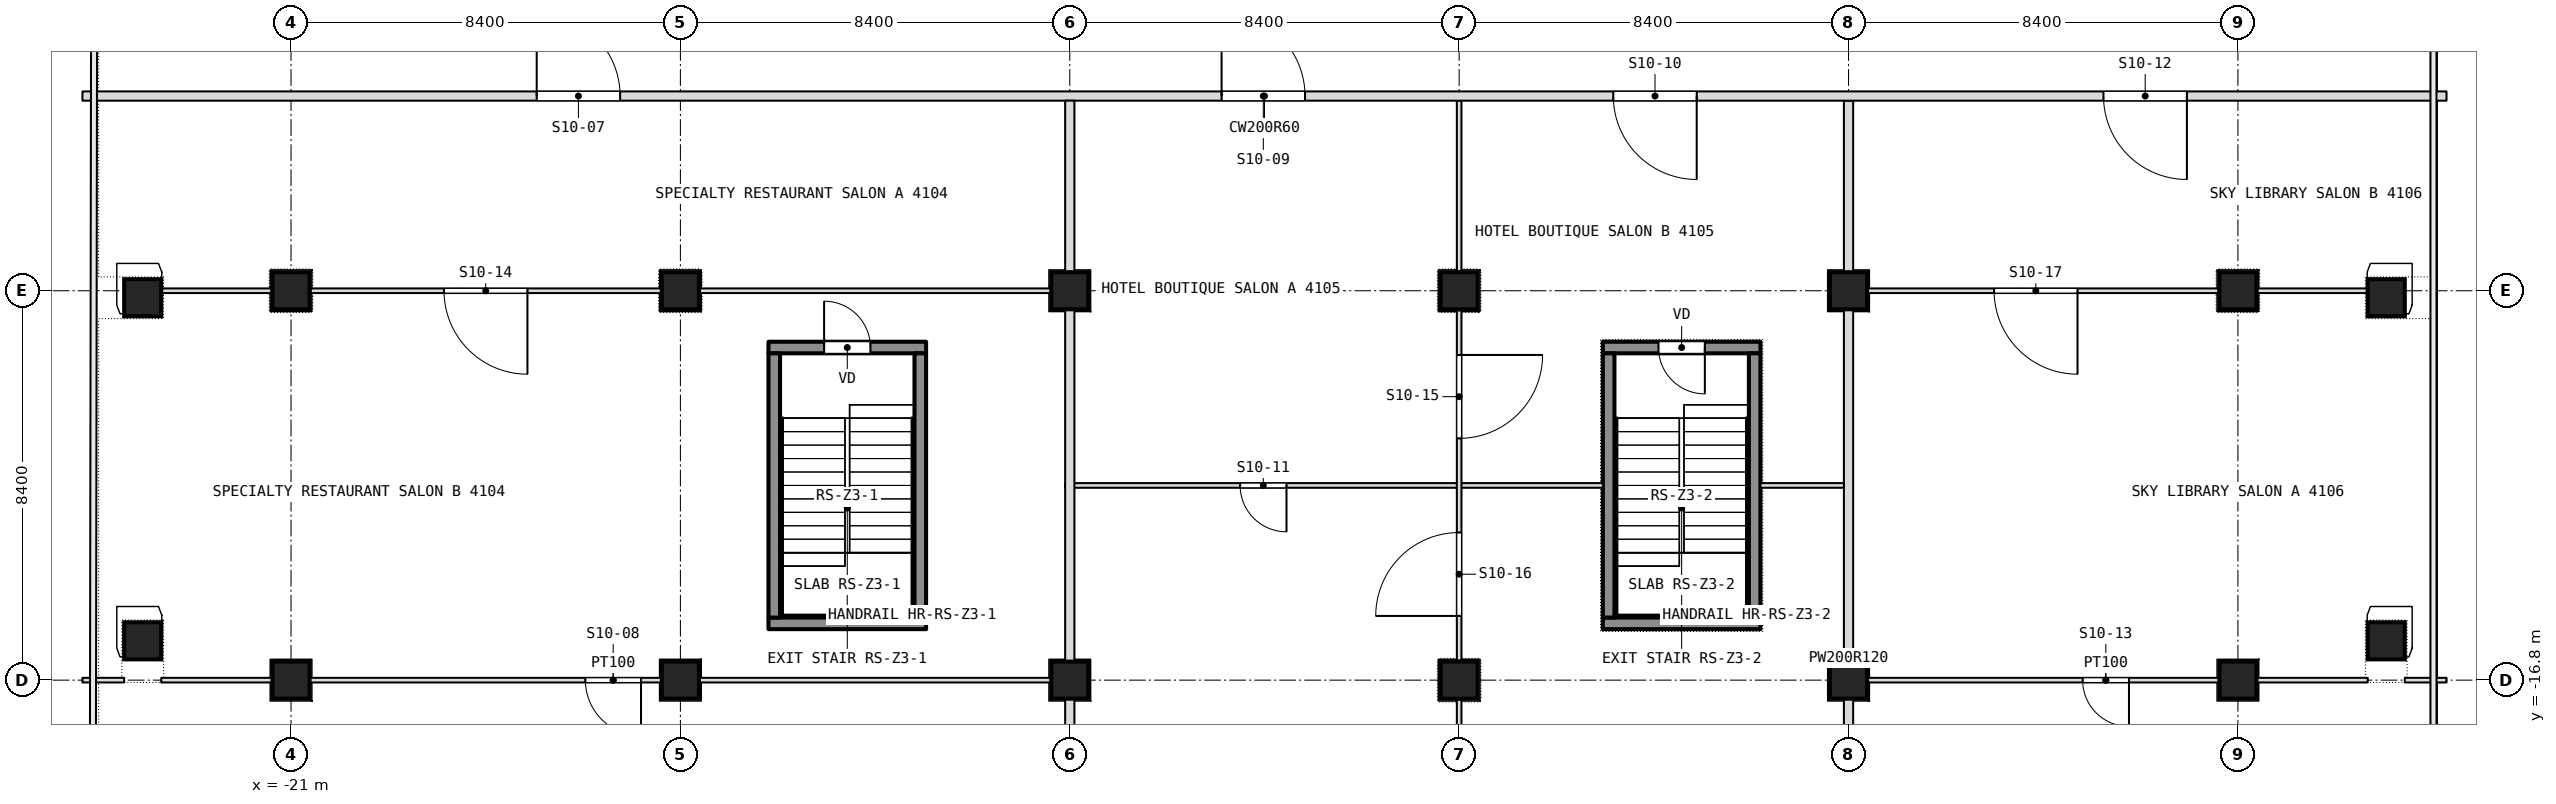
"""IFC4 building model, lengths in metres.
Left out: names, types, materials, properties, quantities, classifications, styles, units other than length and angle.
Written with IfcOpenShell. Run it as: python <this file> out.ifc"""

import sys

from ifc_helpers import new_model, si_unit, direction, frame, frame_2d, origin, origin_2d, place, context, subcontext, project, spatial, rectangle, extrude, element, fill, save


model = new_model("IFC4")
c1 = context("Model", 3, precision=1e-05, world=origin(), true_north=direction((0.0, 1.0)))
c2 = subcontext(c1, "Body", "Model", "MODEL_VIEW")
j1 = project(units=[si_unit("LENGTHUNIT", "METRE"), si_unit("PLANEANGLEUNIT", "RADIAN")], contexts=[c1])
p1 = place(None, origin())
s1 = spatial("IfcSite", under=j1, at=p1, CompositionType="ELEMENT")
p2 = place(p1, origin())
s2 = spatial("IfcBuilding", under=s1, at=p2, CompositionType="ELEMENT")
p3 = place(p2, frame((0.0, 0.0, 180.5)))
s3 = spatial("IfcBuildingStorey", under=s2, at=p3, CompositionType="ELEMENT", Elevation=180.5)
for number, where, z_axis, x_axis in (
    (1, (-21.0, -16.8, 0.0), (0.0, 0.0, 1.0), (1.0, 0.0, 0.0)),
    (2, (-21.0, -8.4, 0.0), (0.0, 0.0, 1.0), (1.0, 0.0, 0.0)),
    (3, (-12.6, -16.8, 0.0), (0.0, 0.0, 1.0), (1.0, 0.0, 0.0)),
    (4, (-12.6, -8.4, 0.0), (0.0, 0.0, 1.0), (1.0, 0.0, 0.0)),
    (5, (-4.2, -16.8, 0.0), (0.0, 0.0, 1.0), (1.0, 0.0, 0.0)),
    (6, (-4.2, -8.4, 0.0), (0.0, 0.0, 1.0), (1.0, 0.0, 0.0)),
    (7, (4.2, -16.8, 0.0), (0.0, 0.0, 1.0), (1.0, 0.0, 0.0)),
    (8, (4.2, -8.4, 0.0), (0.0, 0.0, 1.0), (1.0, 0.0, 0.0)),
    (9, (12.6, -16.8, 0.0), (0.0, 0.0, 1.0), (1.0, 0.0, 0.0)),
    (10, (12.6, -8.4, 0.0), (0.0, 0.0, 1.0), (1.0, 0.0, 0.0)),
    (11, (21.0, -16.8, 0.0), (0.0, 0.0, 1.0), (1.0, 0.0, 0.0)),
    (12, (21.0, -8.4, 0.0), (0.0, 0.0, 1.0), (1.0, 0.0, 0.0)),
    (13, (-24.2, -15.952, 0.0), (0.0, 0.0, 1.0), (1.0, 0.0, 0.0)),
    (14, (-24.2, -8.551, 0.0), (0.0, 0.0, 1.0), (1.0, 0.0, 0.0)),
    (15, (24.2, -8.551, 0.0), (0.0, 0.0, 1.0), (1.0, 0.0, 0.0)),
    (16, (24.2, -15.952, 0.0), (0.0, 0.0, 1.0), (1.0, 0.0, 0.0)),
):
    element("IfcColumn", number, at=place(p3, frame(where, z_axis=z_axis, x_axis=x_axis)), inside=s3, PredefinedType="COLUMN", context=c2, shape_type="SweptSolid", body=[
        extrude(rectangle(XDim=0.8, YDim=0.8, at=origin_2d()), origin(), (0.0, 0.0, 1.0), 7.2),
    ])
p4 = place(p3, frame((-25.5, -16.8, 0.0), z_axis=(0.0, 0.0, 1.0), x_axis=(1.0, 0.0, 0.0)))
e17 = element("IfcWall", 17, at=p4, inside=s3, PredefinedType="PARTITIONING", context=c2, shape_type="SweptSolid", body=[
    extrude(rectangle(XDim=0.9, YDim=0.1, at=frame_2d((0.45, 0.0))), origin(), (0.0, 0.0, 1.0), 6.94),
])
p5 = place(p3, frame((-23.8, -16.8, 0.0), z_axis=(0.0, 0.0, 1.0), x_axis=(1.0, 0.0, 0.0)))
e18 = element("IfcWall", 18, at=p5, inside=s3, PredefinedType="PARTITIONING", context=c2, shape_type="SweptSolid", body=[
    extrude(rectangle(XDim=19.5, YDim=0.1, at=frame_2d((9.75, 0.0))), origin(), (0.0, 0.0, 1.0), 6.54),
])
p6 = place(p5, frame((9.15, 0.0, 0.0)))
e19 = element("IfcOpeningElement", 19, at=p6, cuts=e18, PredefinedType="OPENING", context=c2, shape_type="SweptSolid", body=[
    extrude(rectangle(XDim=1.2, YDim=2.1, at=frame_2d((0.6, 1.05))), frame((0.0, 0.05, 0.0), z_axis=(0.0, -1.0, 0.0), x_axis=(1.0, 0.0, 0.0)), (0.0, 0.0, 1.0), 0.1),
])
p7 = place(p3, frame((12.5, -16.8, 0.0), z_axis=(0.0, 0.0, 1.0), x_axis=(1.0, 0.0, 0.0)))
e20 = element("IfcWall", 20, at=p7, inside=s3, PredefinedType="PARTITIONING", context=c2, shape_type="SweptSolid", body=[
    extrude(rectangle(XDim=11.3, YDim=0.1, at=frame_2d((5.65, 0.0))), origin(), (0.0, 0.0, 1.0), 6.54),
])
p8 = place(p7, frame((5.15, 0.0, 0.0)))
e21 = element("IfcOpeningElement", 21, at=p8, cuts=e20, PredefinedType="OPENING", context=c2, shape_type="SweptSolid", body=[
    extrude(rectangle(XDim=1.0, YDim=2.1, at=frame_2d((0.5, 1.05))), frame((0.0, 0.05, 0.0), z_axis=(0.0, -1.0, 0.0), x_axis=(1.0, 0.0, 0.0)), (0.0, 0.0, 1.0), 0.1),
])
p9 = place(p3, frame((24.6, -16.8, 0.0), z_axis=(0.0, 0.0, 1.0), x_axis=(1.0, 0.0, 0.0)))
e22 = element("IfcWall", 22, at=p9, inside=s3, PredefinedType="PARTITIONING", context=c2, shape_type="SweptSolid", body=[
    extrude(rectangle(XDim=0.9, YDim=0.1, at=frame_2d((0.45, 0.0))), origin(), (0.0, 0.0, 1.0), 6.94),
])
p10 = place(p3, frame((12.6, -28.343, 0.0), z_axis=(0.0, 0.0, 1.0), x_axis=(0.0, 1.0, 0.0)))
e23 = element("IfcWall", 23, at=p10, inside=s3, PredefinedType="PARTITIONING", context=c2, shape_type="SweptSolid", body=[
    extrude(rectangle(XDim=24.043, YDim=0.2, at=frame_2d((12.021, 0.0))), origin(), (0.0, 0.0, 1.0), 6.94),
])
p11 = place(p3, frame((-4.3, -12.6, 0.0), z_axis=(0.0, 0.0, 1.0), x_axis=(1.0, 0.0, 0.0)))
e24 = element("IfcWall", 24, at=p11, inside=s3, PredefinedType="PARTITIONING", context=c2, shape_type="SweptSolid", body=[
    extrude(rectangle(XDim=11.6, YDim=0.1, at=frame_2d((5.8, 0.0))), origin(), (0.0, 0.0, 1.0), 6.94),
])
p12 = place(p11, frame((3.775, 0.0, 0.0)))
e25 = element("IfcOpeningElement", 25, at=p12, cuts=e24, PredefinedType="OPENING", context=c2, shape_type="SweptSolid", body=[
    extrude(rectangle(XDim=1.0, YDim=2.1, at=frame_2d((0.5, 1.05))), frame((0.0, 0.05, 0.0), z_axis=(0.0, -1.0, 0.0), x_axis=(1.0, 0.0, 0.0)), (0.0, 0.0, 1.0), 0.1),
])
p13 = place(p3, frame((10.7, -12.6, 0.0), z_axis=(0.0, 0.0, 1.0), x_axis=(1.0, 0.0, 0.0)))
e26 = element("IfcWall", 26, at=p13, inside=s3, PredefinedType="PARTITIONING", context=c2, shape_type="SweptSolid", body=[
    extrude(rectangle(XDim=1.8, YDim=0.1, at=frame_2d((0.9, 0.0))), origin(), (0.0, 0.0, 1.0), 6.94),
])
p14 = place(p3, frame((-23.8, -8.4, 0.0), z_axis=(0.0, 0.0, 1.0), x_axis=(1.0, 0.0, 0.0)))
e27 = element("IfcWall", 27, at=p14, inside=s3, PredefinedType="PARTITIONING", context=c2, shape_type="SweptSolid", body=[
    extrude(rectangle(XDim=2.38, YDim=0.1, at=frame_2d((1.19, 0.0))), origin(), (0.0, 0.0, 1.0), 6.54),
])
p15 = place(p3, frame((-20.58, -8.4, 0.0), z_axis=(0.0, 0.0, 1.0), x_axis=(1.0, 0.0, 0.0)))
e28 = element("IfcWall", 28, at=p15, inside=s3, PredefinedType="PARTITIONING", context=c2, shape_type="SweptSolid", body=[
    extrude(rectangle(XDim=7.56, YDim=0.1, at=frame_2d((3.78, 0.0))), origin(), (0.0, 0.0, 1.0), 6.54),
])
p16 = place(p15, frame((2.88, 0.0, 0.0)))
e29 = element("IfcOpeningElement", 29, at=p16, cuts=e28, PredefinedType="OPENING", context=c2, shape_type="SweptSolid", body=[
    extrude(rectangle(XDim=1.8, YDim=2.1, at=frame_2d((0.9, 1.05))), frame((0.0, 0.05, 0.0), z_axis=(0.0, -1.0, 0.0), x_axis=(1.0, 0.0, 0.0)), (0.0, 0.0, 1.0), 0.1),
])
p17 = place(p3, frame((-12.18, -8.4, 0.0), z_axis=(0.0, 0.0, 1.0), x_axis=(1.0, 0.0, 0.0)))
e30 = element("IfcWall", 30, at=p17, inside=s3, PredefinedType="PARTITIONING", context=c2, shape_type="SweptSolid", body=[
    extrude(rectangle(XDim=7.88, YDim=0.1, at=frame_2d((3.94, 0.0))), origin(), (0.0, 0.0, 1.0), 6.54),
])
p18 = place(p3, frame((12.7, -8.4, 0.0), z_axis=(0.0, 0.0, 1.0), x_axis=(1.0, 0.0, 0.0)))
e31 = element("IfcWall", 31, at=p18, inside=s3, PredefinedType="PARTITIONING", context=c2, shape_type="SweptSolid", body=[
    extrude(rectangle(XDim=7.88, YDim=0.1, at=frame_2d((3.94, 0.0))), origin(), (0.0, 0.0, 1.0), 6.54),
])
p19 = place(p18, frame((3.04, 0.0, 0.0)))
e32 = element("IfcOpeningElement", 32, at=p19, cuts=e31, PredefinedType="OPENING", context=c2, shape_type="SweptSolid", body=[
    extrude(rectangle(XDim=1.8, YDim=2.1, at=frame_2d((0.9, 1.05))), frame((0.0, 0.05, 0.0), z_axis=(0.0, -1.0, 0.0), x_axis=(1.0, 0.0, 0.0)), (0.0, 0.0, 1.0), 0.1),
])
p20 = place(p3, frame((21.42, -8.4, 0.0), z_axis=(0.0, 0.0, 1.0), x_axis=(1.0, 0.0, 0.0)))
e33 = element("IfcWall", 33, at=p20, inside=s3, PredefinedType="PARTITIONING", context=c2, shape_type="SweptSolid", body=[
    extrude(rectangle(XDim=2.38, YDim=0.1, at=frame_2d((1.19, 0.0))), origin(), (0.0, 0.0, 1.0), 6.54),
])
p21 = place(p3, frame((4.2, -24.78, 0.0), z_axis=(0.0, 0.0, 1.0), x_axis=(0.0, 1.0, 0.0)))
e34 = element("IfcWall", 34, at=p21, inside=s3, PredefinedType="PARTITIONING", context=c2, shape_type="SweptSolid", body=[
    extrude(rectangle(XDim=7.56, YDim=0.1, at=frame_2d((3.78, 0.0))), origin(), (0.0, 0.0, 1.0), 6.94),
])
p22 = place(p3, frame((4.2, -16.38, 0.0), z_axis=(0.0, 0.0, 1.0), x_axis=(0.0, 1.0, 0.0)))
e35 = element("IfcWall", 35, at=p22, inside=s3, PredefinedType="PARTITIONING", context=c2, shape_type="SweptSolid", body=[
    extrude(rectangle(XDim=7.56, YDim=0.1, at=frame_2d((3.78, 0.0))), origin(), (0.0, 0.0, 1.0), 6.94),
])
p23 = place(p22, frame((4.795, 0.0, 0.0)))
e36 = element("IfcOpeningElement", 36, at=p23, cuts=e35, PredefinedType="OPENING", context=c2, shape_type="SweptSolid", body=[
    extrude(rectangle(XDim=1.8, YDim=2.1, at=frame_2d((0.9, 1.05))), frame((0.0, 0.05, 0.0), z_axis=(0.0, -1.0, 0.0), x_axis=(1.0, 0.0, 0.0)), (0.0, 0.0, 1.0), 0.1),
])
p24 = place(p22, frame((0.965, 0.0, 0.0)))
e37 = element("IfcOpeningElement", 37, at=p24, cuts=e35, PredefinedType="OPENING", context=c2, shape_type="SweptSolid", body=[
    extrude(rectangle(XDim=1.8, YDim=2.1, at=frame_2d((0.9, 1.05))), frame((0.0, 0.05, 0.0), z_axis=(0.0, -1.0, 0.0), x_axis=(1.0, 0.0, 0.0)), (0.0, 0.0, 1.0), 0.1),
])
p25 = place(p3, frame((4.2, -7.98, 0.0), z_axis=(0.0, 0.0, 1.0), x_axis=(0.0, 1.0, 0.0)))
e38 = element("IfcWall", 38, at=p25, inside=s3, PredefinedType="PARTITIONING", context=c2, shape_type="SweptSolid", body=[
    extrude(rectangle(XDim=3.68, YDim=0.1, at=frame_2d((1.84, 0.0))), origin(), (0.0, 0.0, 1.0), 6.94),
])
p26 = place(p3, frame((-25.5, -4.2, 0.0), z_axis=(0.0, 0.0, 1.0), x_axis=(1.0, 0.0, 0.0)))
e39 = element("IfcWall", 39, at=p26, inside=s3, PredefinedType="PARTITIONING", context=c2, shape_type="SweptSolid", body=[
    extrude(rectangle(XDim=51.0, YDim=0.2, at=frame_2d((25.5, 0.0))), origin(), (0.0, 0.0, 1.0), 6.94),
])
p27 = place(p26, frame((9.8, 0.0, 0.0)))
e40 = element("IfcOpeningElement", 40, at=p27, cuts=e39, PredefinedType="OPENING", context=c2, shape_type="SweptSolid", body=[
    extrude(rectangle(XDim=1.8, YDim=2.1, at=frame_2d((0.9, 1.05))), frame((0.0, 0.1, 0.0), z_axis=(0.0, -1.0, 0.0), x_axis=(1.0, 0.0, 0.0)), (0.0, 0.0, 1.0), 0.2),
])
p28 = place(p26, frame((24.575, 0.0, 0.0)))
e41 = element("IfcOpeningElement", 41, at=p28, cuts=e39, PredefinedType="OPENING", context=c2, shape_type="SweptSolid", body=[
    extrude(rectangle(XDim=1.8, YDim=2.1, at=frame_2d((0.9, 1.05))), frame((0.0, 0.1, 0.0), z_axis=(0.0, -1.0, 0.0), x_axis=(1.0, 0.0, 0.0)), (0.0, 0.0, 1.0), 0.2),
])
p29 = place(p26, frame((33.025, 0.0, 0.0)))
e42 = element("IfcOpeningElement", 42, at=p29, cuts=e39, PredefinedType="OPENING", context=c2, shape_type="SweptSolid", body=[
    extrude(rectangle(XDim=1.8, YDim=2.1, at=frame_2d((0.9, 1.05))), frame((0.0, 0.1, 0.0), z_axis=(0.0, -1.0, 0.0), x_axis=(1.0, 0.0, 0.0)), (0.0, 0.0, 1.0), 0.2),
])
p30 = place(p26, frame((43.6, 0.0, 0.0)))
e43 = element("IfcOpeningElement", 43, at=p30, cuts=e39, PredefinedType="OPENING", context=c2, shape_type="SweptSolid", body=[
    extrude(rectangle(XDim=1.8, YDim=2.1, at=frame_2d((0.9, 1.05))), frame((0.0, 0.1, 0.0), z_axis=(0.0, -1.0, 0.0), x_axis=(1.0, 0.0, 0.0)), (0.0, 0.0, 1.0), 0.2),
])
p31 = place(p3, frame((-4.2, -28.9, 0.0), z_axis=(0.0, 0.0, 1.0), x_axis=(0.0, 1.0, 0.0)))
e44 = element("IfcWall", 44, at=p31, inside=s3, PredefinedType="PARTITIONING", context=c2, shape_type="SweptSolid", body=[
    extrude(rectangle(XDim=24.6, YDim=0.2, at=frame_2d((12.3, 0.0))), origin(), (0.0, 0.0, 1.0), 6.94),
])
p32 = place(p3, frame((-10.7, -15.575, -0.26), z_axis=(0.0, 0.0, 1.0), x_axis=(1.0, 0.0, 0.0)))
e45 = element("IfcWall", 45, at=p32, inside=s3, PredefinedType="SHEAR", context=c2, shape_type="SweptSolid", body=[
    extrude(rectangle(XDim=3.4, YDim=0.25, at=frame_2d((1.7, 0.0))), origin(), (0.0, 0.0, 1.0), 7.56),
])
p33 = place(p3, frame((-10.7, -9.625, -0.26), z_axis=(0.0, 0.0, 1.0), x_axis=(1.0, 0.0, 0.0)))
e46 = element("IfcWall", 46, at=p33, inside=s3, PredefinedType="SHEAR", context=c2, shape_type="SweptSolid", body=[
    extrude(rectangle(XDim=3.4, YDim=0.25, at=frame_2d((1.7, 0.0))), origin(), (0.0, 0.0, 1.0), 7.56),
])
p34 = place(p33, frame((1.2, 0.0, 0.0)))
e47 = element("IfcOpeningElement", 47, at=p34, cuts=e46, PredefinedType="OPENING", context=c2, shape_type="SweptSolid", body=[
    extrude(rectangle(XDim=1.0, YDim=2.1, at=frame_2d((0.5, 1.05))), frame((0.0, 0.125, 0.0), z_axis=(0.0, -1.0, 0.0), x_axis=(1.0, 0.0, 0.0)), (0.0, 0.0, 1.0), 0.25),
])
for number, where, z_axis, x_axis in (
    (48, (-10.575, -15.45, -0.26), (0.0, 0.0, 1.0), (0.0, 1.0, 0.0)),
    (49, (-7.425, -15.45, -0.26), (0.0, 0.0, 1.0), (0.0, 1.0, 0.0)),
):
    element("IfcWall", number, at=place(p3, frame(where, z_axis=z_axis, x_axis=x_axis)), inside=s3, PredefinedType="SHEAR", context=c2, shape_type="SweptSolid", body=[
        extrude(rectangle(XDim=5.7, YDim=0.25, at=frame_2d((2.85, 0.0))), origin(), (0.0, 0.0, 1.0), 7.56),
    ])
p35 = place(p3, frame((7.3, -15.575, -0.26), z_axis=(0.0, 0.0, 1.0), x_axis=(1.0, 0.0, 0.0)))
e50 = element("IfcWall", 50, at=p35, inside=s3, PredefinedType="SHEAR", context=c2, shape_type="SweptSolid", body=[
    extrude(rectangle(XDim=3.4, YDim=0.25, at=frame_2d((1.7, 0.0))), origin(), (0.0, 0.0, 1.0), 7.56),
])
p36 = place(p3, frame((7.3, -9.625, -0.26), z_axis=(0.0, 0.0, 1.0), x_axis=(1.0, 0.0, 0.0)))
e51 = element("IfcWall", 51, at=p36, inside=s3, PredefinedType="SHEAR", context=c2, shape_type="SweptSolid", body=[
    extrude(rectangle(XDim=3.4, YDim=0.25, at=frame_2d((1.7, 0.0))), origin(), (0.0, 0.0, 1.0), 7.56),
])
p37 = place(p36, frame((1.2, 0.0, 0.0)))
e52 = element("IfcOpeningElement", 52, at=p37, cuts=e51, PredefinedType="OPENING", context=c2, shape_type="SweptSolid", body=[
    extrude(rectangle(XDim=1.0, YDim=2.1, at=frame_2d((0.5, 1.05))), frame((0.0, 0.125, 0.0), z_axis=(0.0, -1.0, 0.0), x_axis=(1.0, 0.0, 0.0)), (0.0, 0.0, 1.0), 0.25),
])
for number, where, z_axis, x_axis in (
    (53, (7.425, -15.45, -0.26), (0.0, 0.0, 1.0), (0.0, 1.0, 0.0)),
    (54, (10.575, -15.45, -0.26), (0.0, 0.0, 1.0), (0.0, 1.0, 0.0)),
):
    element("IfcWall", number, at=place(p3, frame(where, z_axis=z_axis, x_axis=x_axis)), inside=s3, PredefinedType="SHEAR", context=c2, shape_type="SweptSolid", body=[
        extrude(rectangle(XDim=5.7, YDim=0.25, at=frame_2d((2.85, 0.0))), origin(), (0.0, 0.0, 1.0), 7.56),
    ])
p38 = place(p6, origin())
e55 = element("IfcDoor", 55, at=p38, inside=s3, OperationType="SINGLE_SWING_LEFT", PredefinedType="DOOR", context=c2, shape_type="SweptSolid", body=[
    extrude(rectangle(XDim=1.2, YDim=2.1, at=frame_2d((0.6, 1.05))), frame((0.0, 0.025, 0.0), z_axis=(0.0, -1.0, 0.0), x_axis=(1.0, 0.0, 0.0)), (0.0, 0.0, 1.0), 0.05),
])
fill(e19, e55)
p39 = place(p8, origin())
e56 = element("IfcDoor", 56, at=p39, inside=s3, OperationType="SINGLE_SWING_LEFT", PredefinedType="DOOR", context=c2, shape_type="SweptSolid", body=[
    extrude(rectangle(XDim=1.0, YDim=2.1, at=frame_2d((0.5, 1.05))), frame((0.0, 0.025, 0.0), z_axis=(0.0, -1.0, 0.0), x_axis=(1.0, 0.0, 0.0)), (0.0, 0.0, 1.0), 0.05),
])
fill(e21, e56)
p40 = place(p12, origin())
e57 = element("IfcDoor", 57, at=p40, inside=s3, OperationType="SINGLE_SWING_RIGHT", PredefinedType="DOOR", context=c2, shape_type="SweptSolid", body=[
    extrude(rectangle(XDim=1.0, YDim=2.1, at=frame_2d((0.5, 1.05))), frame((0.0, 0.025, 0.0), z_axis=(0.0, -1.0, 0.0), x_axis=(1.0, 0.0, 0.0)), (0.0, 0.0, 1.0), 0.05),
])
fill(e25, e57)
p41 = place(p16, origin())
e58 = element("IfcDoor", 58, at=p41, inside=s3, OperationType="DOUBLE_DOOR_SINGLE_SWING", PredefinedType="DOOR", context=c2, shape_type="SweptSolid", body=[
    extrude(rectangle(XDim=1.8, YDim=2.1, at=frame_2d((0.9, 1.05))), frame((0.0, 0.025, 0.0), z_axis=(0.0, -1.0, 0.0), x_axis=(1.0, 0.0, 0.0)), (0.0, 0.0, 1.0), 0.05),
])
fill(e29, e58)
p42 = place(p19, origin())
e59 = element("IfcDoor", 59, at=p42, inside=s3, OperationType="DOUBLE_DOOR_SINGLE_SWING", PredefinedType="DOOR", context=c2, shape_type="SweptSolid", body=[
    extrude(rectangle(XDim=1.8, YDim=2.1, at=frame_2d((0.9, 1.05))), frame((0.0, 0.025, 0.0), z_axis=(0.0, -1.0, 0.0), x_axis=(1.0, 0.0, 0.0)), (0.0, 0.0, 1.0), 0.05),
])
fill(e32, e59)
p43 = place(p23, origin())
e60 = element("IfcDoor", 60, at=p43, inside=s3, OperationType="DOUBLE_DOOR_SINGLE_SWING", PredefinedType="DOOR", context=c2, shape_type="SweptSolid", body=[
    extrude(rectangle(XDim=1.8, YDim=2.1, at=frame_2d((0.9, 1.05))), frame((0.0, 0.025, 0.0), z_axis=(0.0, -1.0, 0.0), x_axis=(1.0, 0.0, 0.0)), (0.0, 0.0, 1.0), 0.05),
])
fill(e36, e60)
p44 = place(p24, origin())
e61 = element("IfcDoor", 61, at=p44, inside=s3, OperationType="DOUBLE_DOOR_SINGLE_SWING", PredefinedType="DOOR", context=c2, shape_type="SweptSolid", body=[
    extrude(rectangle(XDim=1.8, YDim=2.1, at=frame_2d((0.9, 1.05))), frame((0.0, 0.025, 0.0), z_axis=(0.0, -1.0, 0.0), x_axis=(1.0, 0.0, 0.0)), (0.0, 0.0, 1.0), 0.05),
])
fill(e37, e61)
p45 = place(p27, origin())
e62 = element("IfcDoor", 62, at=p45, inside=s3, OperationType="DOUBLE_DOOR_SINGLE_SWING", PredefinedType="DOOR", context=c2, shape_type="SweptSolid", body=[
    extrude(rectangle(XDim=1.8, YDim=2.1, at=frame_2d((0.9, 1.05))), frame((0.0, 0.025, 0.0), z_axis=(0.0, -1.0, 0.0), x_axis=(1.0, 0.0, 0.0)), (0.0, 0.0, 1.0), 0.05),
])
fill(e40, e62)
p46 = place(p28, origin())
e63 = element("IfcDoor", 63, at=p46, inside=s3, OperationType="DOUBLE_DOOR_SINGLE_SWING", PredefinedType="DOOR", context=c2, shape_type="SweptSolid", body=[
    extrude(rectangle(XDim=1.8, YDim=2.1, at=frame_2d((0.9, 1.05))), frame((0.0, 0.025, 0.0), z_axis=(0.0, -1.0, 0.0), x_axis=(1.0, 0.0, 0.0)), (0.0, 0.0, 1.0), 0.05),
])
fill(e41, e63)
p47 = place(p29, origin())
e64 = element("IfcDoor", 64, at=p47, inside=s3, OperationType="DOUBLE_DOOR_SINGLE_SWING", PredefinedType="DOOR", context=c2, shape_type="SweptSolid", body=[
    extrude(rectangle(XDim=1.8, YDim=2.1, at=frame_2d((0.9, 1.05))), frame((0.0, 0.025, 0.0), z_axis=(0.0, -1.0, 0.0), x_axis=(1.0, 0.0, 0.0)), (0.0, 0.0, 1.0), 0.05),
])
fill(e42, e64)
p48 = place(p30, origin())
e65 = element("IfcDoor", 65, at=p48, inside=s3, OperationType="DOUBLE_DOOR_SINGLE_SWING", PredefinedType="DOOR", context=c2, shape_type="SweptSolid", body=[
    extrude(rectangle(XDim=1.8, YDim=2.1, at=frame_2d((0.9, 1.05))), frame((0.0, 0.025, 0.0), z_axis=(0.0, -1.0, 0.0), x_axis=(1.0, 0.0, 0.0)), (0.0, 0.0, 1.0), 0.05),
])
fill(e43, e65)
p49 = place(p34, origin())
e66 = element("IfcDoor", 66, at=p49, inside=s3, OperationType="SINGLE_SWING_LEFT", PredefinedType="DOOR", context=c2, shape_type="SweptSolid", body=[
    extrude(rectangle(XDim=1.0, YDim=2.1, at=frame_2d((0.5, 1.05))), frame((0.0, 0.025, 0.0), z_axis=(0.0, -1.0, 0.0), x_axis=(1.0, 0.0, 0.0)), (0.0, 0.0, 1.0), 0.05),
])
fill(e47, e66)
p50 = place(p37, origin())
e67 = element("IfcDoor", 67, at=p50, inside=s3, OperationType="SINGLE_SWING_LEFT", PredefinedType="DOOR", context=c2, shape_type="SweptSolid", body=[
    extrude(rectangle(XDim=1.0, YDim=2.1, at=frame_2d((0.5, 1.05))), frame((0.0, 0.025, 0.0), z_axis=(0.0, -1.0, 0.0), x_axis=(1.0, 0.0, 0.0)), (0.0, 0.0, 1.0), 0.05),
])
fill(e52, e67)
save(model, sys.argv[1])
